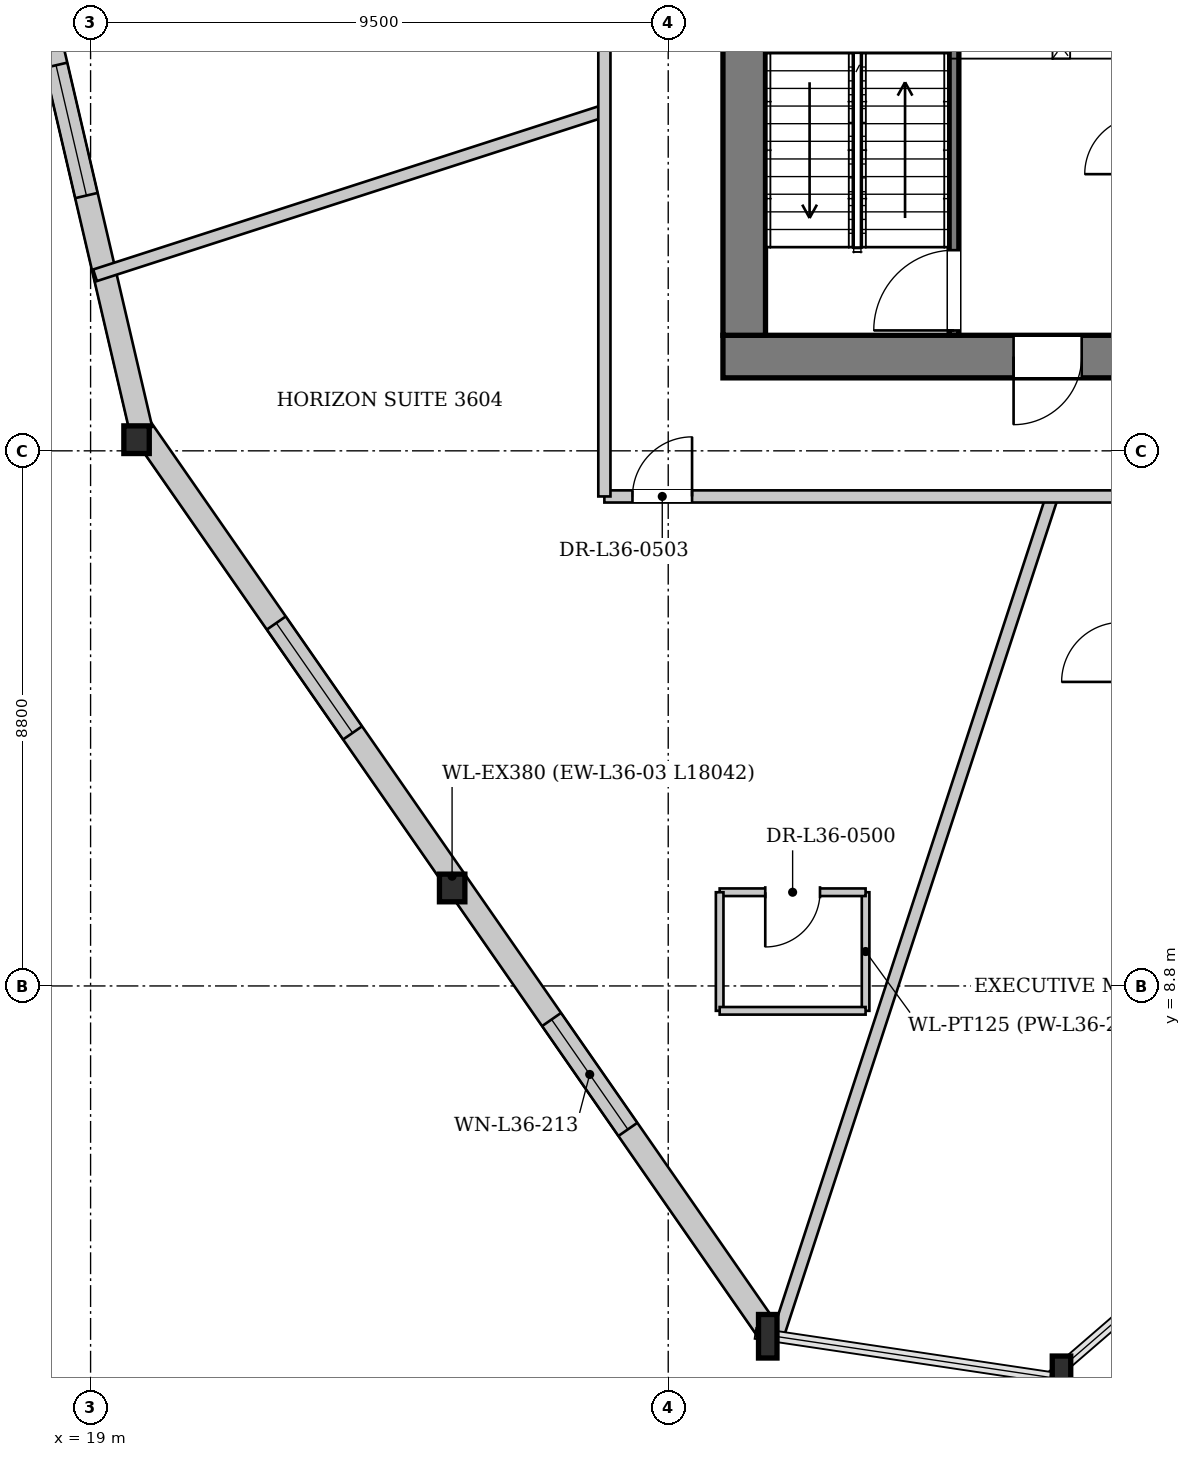
"""IFC4 building model, lengths in metres.
Left out: names, types, materials, properties, quantities, classifications, styles, units other than length and angle.
Written with IfcOpenShell. Run it as: python <this file> out.ifc"""

import sys

from ifc_helpers import new_model, si_unit, direction, frame, frame_2d, origin, origin_2d, place, context, subcontext, project, spatial, rectangle, i_section, extrude, source, transform, mapped, element, fill, save


model = new_model("IFC4")
c1 = context("Model", 3, precision=1e-05, world=origin(), true_north=direction((0.0, 1.0)))
c2 = subcontext(c1, "Body", "Model", "MODEL_VIEW")
j1 = project(units=[si_unit("LENGTHUNIT", "METRE"), si_unit("PLANEANGLEUNIT", "RADIAN")], contexts=[c1])
p1 = place(None, origin())
s1 = spatial("IfcSite", under=j1, at=p1, CompositionType="ELEMENT")
p2 = place(p1, origin())
s2 = spatial("IfcBuilding", under=s1, at=p2, CompositionType="ELEMENT")
p3 = place(p2, frame((0.0, 0.0, 138.1)))
s3 = spatial("IfcBuildingStorey", under=s2, at=p3, CompositionType="ELEMENT", Elevation=138.1)
m1 = source(origin(), c2, "Body", "SweptSolid", [
    extrude(i_section(OverallWidth=0.418, OverallDepth=0.455, WebThickness=0.038, FlangeThickness=0.059, at=origin_2d()), origin(), (0.0, 0.0, 1.0), 3.849),
])
p4 = place(p3, frame((19.644, 17.906, 0.0), z_axis=(0.058158983264, -0.064057331621, 0.996250064457), x_axis=(0.740371121791, 0.672198335329, 0.0)))
e1 = element("IfcColumn", 1, at=p4, inside=s3, PredefinedType="COLUMN", context=c2, shape_type="MappedRepresentation", body=[
    mapped(m1, transform((0.0, 0.0, 0.0), x_axis=(1.0, 0.0, 0.0), y_axis=(0.0, 1.0, 0.0), z_axis=(0.0, 0.0, 1.0), scale=1.0)),
])
m2 = source(origin(), c2, "Body", "SweptSolid", [
    extrude(i_section(OverallWidth=0.418, OverallDepth=0.455, WebThickness=0.038, FlangeThickness=0.059, at=origin_2d()), origin(), (0.0, 0.0, 1.0), 3.852),
])
p5 = place(p3, frame((24.789, 10.497, 0.0), z_axis=(0.08164191411, -0.044307218915, 0.995676387293), x_axis=(0.476986447057, 0.878910649227, 0.0)))
e2 = element("IfcColumn", 2, at=p5, inside=s3, PredefinedType="COLUMN", context=c2, shape_type="MappedRepresentation", body=[
    mapped(m2, transform((0.0, 0.0, 0.0), x_axis=(1.0, 0.0, 0.0), y_axis=(0.0, 1.0, 0.0), z_axis=(0.0, 0.0, 1.0), scale=1.0)),
])
m3 = source(origin(), c2, "Body", "SweptSolid", [
    extrude(i_section(OverallWidth=0.304, OverallDepth=0.716, WebThickness=0.021, FlangeThickness=0.04, at=origin_2d()), origin(), (0.0, 0.0, 1.0), 3.857),
])
p6 = place(p3, frame((29.934, 3.087, 0.0), z_axis=(0.105061568815, -0.02461984956, 0.99416091744), x_axis=(0.228156573902, 0.973624454184, 0.0)))
e3 = element("IfcColumn", 3, at=p6, inside=s3, PredefinedType="COLUMN", context=c2, shape_type="MappedRepresentation", body=[
    mapped(m3, transform((0.0, 0.0, 0.0), x_axis=(1.0, 0.0, 0.0), y_axis=(0.0, 1.0, 0.0), z_axis=(0.0, 0.0, 1.0), scale=1.0)),
])
m4 = source(origin(), c2, "Body", "SweptSolid", [
    extrude(i_section(OverallWidth=0.304, OverallDepth=0.716, WebThickness=0.021, FlangeThickness=0.04, at=origin_2d()), origin(), (0.0, 0.0, 1.0), 3.852),
])
p7 = place(p3, frame((34.785, 2.362, 0.0), z_axis=(0.094871440027, -0.003105344396, 0.995484689337), x_axis=(0.032714610528, 0.999464733874, 0.0)))
e4 = element("IfcColumn", 4, at=p7, inside=s3, PredefinedType="COLUMN", context=c2, shape_type="MappedRepresentation", body=[
    mapped(m4, transform((0.0, 0.0, 0.0), x_axis=(1.0, 0.0, 0.0), y_axis=(0.0, 1.0, 0.0), z_axis=(0.0, 0.0, 1.0), scale=1.0)),
])
p8 = place(p3, frame((30.09, 3.195, 0.0), z_axis=(0.0, 0.0, 1.0), x_axis=(-0.57033951124, 0.821409058824, 0.0)))
e5 = element("IfcWall", 5, at=p8, inside=s3, PredefinedType="SOLIDWALL", context=c2, shape_type="SweptSolid", body=[
    extrude(rectangle(XDim=18.042, YDim=0.38, at=frame_2d((9.021, 0.0))), origin(), (0.0, 0.0, 1.0), 2.972),
])
p9 = place(p8, frame((3.952, 0.0, 0.602)))
e6 = element("IfcOpeningElement", 6, at=p9, cuts=e5, PredefinedType="OPENING", context=c2, shape_type="SweptSolid", body=[
    extrude(rectangle(XDim=2.2, YDim=2.25, at=frame_2d((1.1, 1.125))), frame((0.0, 0.2, 0.0), z_axis=(0.0, -1.0, 0.0), x_axis=(1.0, 0.0, 0.0)), (0.0, 0.0, 1.0), 0.4),
])
p10 = place(p8, frame((11.89, 0.0, 0.602)))
e7 = element("IfcOpeningElement", 7, at=p10, cuts=e5, PredefinedType="OPENING", context=c2, shape_type="SweptSolid", body=[
    extrude(rectangle(XDim=2.2, YDim=2.25, at=frame_2d((1.1, 1.125))), frame((0.0, 0.2, 0.0), z_axis=(0.0, -1.0, 0.0), x_axis=(1.0, 0.0, 0.0)), (0.0, 0.0, 1.0), 0.4),
])
p11 = place(p3, frame((19.829, 17.95, 0.0), z_axis=(0.0, 0.0, 1.0), x_axis=(-0.22713293769, 0.973863762862, 0.0)))
e8 = element("IfcWall", 8, at=p11, inside=s3, PredefinedType="SOLIDWALL", context=c2, shape_type="SweptSolid", body=[
    extrude(rectangle(XDim=18.042, YDim=0.38, at=frame_2d((9.021, 0.0))), origin(), (0.0, 0.0, 1.0), 2.972),
])
p12 = place(p11, frame((3.952, 0.0, 0.602)))
e9 = element("IfcOpeningElement", 9, at=p12, cuts=e8, PredefinedType="OPENING", context=c2, shape_type="SweptSolid", body=[
    extrude(rectangle(XDim=2.2, YDim=2.25, at=frame_2d((1.1, 1.125))), frame((0.0, 0.2, 0.0), z_axis=(0.0, -1.0, 0.0), x_axis=(1.0, 0.0, 0.0)), (0.0, 0.0, 1.0), 0.4),
])
p13 = place(p11, frame((11.89, 0.0, 0.602)))
e10 = element("IfcOpeningElement", 10, at=p13, cuts=e8, PredefinedType="OPENING", context=c2, shape_type="SweptSolid", body=[
    extrude(rectangle(XDim=2.2, YDim=2.25, at=frame_2d((1.1, 1.125))), frame((0.0, 0.2, 0.0), z_axis=(0.0, -1.0, 0.0), x_axis=(1.0, 0.0, 0.0)), (0.0, 0.0, 1.0), 0.4),
])
p14 = place(p3, frame((46.6, 19.15, 0.0), z_axis=(0.0, 0.0, 1.0), x_axis=(-1.0, 0.0, 0.0)))
e11 = element("IfcWall", 11, at=p14, inside=s3, PredefinedType="SHEAR", context=c2, shape_type="SweptSolid", body=[
    extrude(rectangle(XDim=17.2, YDim=0.7, at=frame_2d((8.6, 0.0))), origin(), (0.0, 0.0, 1.0), 3.58),
])
p15 = place(p14, frame((4.8, 0.0, 0.0)))
e12 = element("IfcOpeningElement", 12, at=p15, cuts=e11, PredefinedType="OPENING", context=c2, shape_type="SweptSolid", body=[
    extrude(rectangle(XDim=1.12, YDim=2.25, at=frame_2d((0.56, 1.125))), frame((0.0, 0.36, 0.0), z_axis=(0.0, -1.0, 0.0), x_axis=(1.0, 0.0, 0.0)), (0.0, 0.0, 1.0), 0.72),
])
p16 = place(p14, frame((11.3, 0.0, 0.0)))
e13 = element("IfcOpeningElement", 13, at=p16, cuts=e11, PredefinedType="OPENING", context=c2, shape_type="SweptSolid", body=[
    extrude(rectangle(XDim=1.12, YDim=2.25, at=frame_2d((0.56, 1.125))), frame((0.0, 0.36, 0.0), z_axis=(0.0, -1.0, 0.0), x_axis=(1.0, 0.0, 0.0)), (0.0, 0.0, 1.0), 0.72),
])
p17 = place(p3, frame((29.75, 19.5, 0.0), z_axis=(0.0, 0.0, 1.0), x_axis=(0.0, 1.0, 0.0)))
e14 = element("IfcWall", 14, at=p17, inside=s3, PredefinedType="SHEAR", context=c2, shape_type="SweptSolid", body=[
    extrude(rectangle(XDim=14.2, YDim=0.7, at=frame_2d((7.1, 0.0))), origin(), (0.0, 0.0, 1.0), 3.58),
])
p18 = place(p17, frame((7.42, 0.0, 0.0)))
e15 = element("IfcOpeningElement", 15, at=p18, cuts=e14, PredefinedType="OPENING", context=c2, shape_type="SweptSolid", body=[
    extrude(rectangle(XDim=1.6, YDim=2.2, at=frame_2d((0.8, 1.1))), frame((0.0, 0.36, 0.0), z_axis=(0.0, -1.0, 0.0), x_axis=(1.0, 0.0, 0.0)), (0.0, 0.0, 1.0), 0.72),
])
p19 = place(p3, frame((33.2, 19.5, 0.0), z_axis=(0.0, 0.0, 1.0), x_axis=(0.0, 1.0, 0.0)))
e16 = element("IfcWall", 16, at=p19, inside=s3, PredefinedType="PARTITIONING", context=c2, shape_type="SweptSolid", body=[
    extrude(rectangle(XDim=7.46, YDim=0.16, at=frame_2d((3.73, 0.0))), origin(), (0.0, 0.0, 1.0), 3.58),
])
p20 = place(p19, frame((0.08, 0.0, 0.0)))
e17 = element("IfcOpeningElement", 17, at=p20, cuts=e16, PredefinedType="OPENING", context=c2, shape_type="SweptSolid", body=[
    extrude(rectangle(XDim=1.32, YDim=2.2, at=frame_2d((0.66, 1.1))), frame((0.0, 0.09, 0.0), z_axis=(0.0, -1.0, 0.0), x_axis=(1.0, 0.0, 0.0)), (0.0, 0.0, 1.0), 0.18),
])
p21 = place(p3, frame((27.45, 23.192, 0.0), z_axis=(0.0, 0.0, 1.0), x_axis=(-0.951598248923, -0.307344713061, 0.0)))
e18 = element("IfcWall", 18, at=p21, inside=s3, PredefinedType="PARTITIONING", context=c2, shape_type="SweptSolid", body=[
    extrude(rectangle(XDim=8.803, YDim=0.2, at=frame_2d((4.401, 0.0))), origin(), (0.0, 0.0, 1.0), 3.58),
])
p22 = place(p3, frame((34.813, 16.85, 0.0), z_axis=(0.0, 0.0, 1.0), x_axis=(-0.31067365158, -0.95051663963, 0.0)))
e19 = element("IfcWall", 19, at=p22, inside=s3, PredefinedType="PARTITIONING", context=c2, shape_type="SweptSolid", body=[
    extrude(rectangle(XDim=14.507, YDim=0.2, at=frame_2d((7.253, 0.0))), origin(), (0.0, 0.0, 1.0), 3.075),
])
p23 = place(p3, frame((31.746, 8.391, 0.0), z_axis=(0.0, 0.0, 1.0), x_axis=(0.0, 1.0, 0.0)))
e20 = element("IfcWall", 20, at=p23, inside=s3, PredefinedType="PARTITIONING", context=c2, shape_type="SweptSolid", body=[
    extrude(rectangle(XDim=1.95, YDim=0.125, at=frame_2d((0.975, 0.0))), origin(), (0.0, 0.0, 1.0), 3.58),
])
p24 = place(p3, frame((31.746, 10.341, 0.0), z_axis=(0.0, 0.0, 1.0), x_axis=(-1.0, 0.0, 0.0)))
e21 = element("IfcWall", 21, at=p24, inside=s3, PredefinedType="PARTITIONING", context=c2, shape_type="SweptSolid", body=[
    extrude(rectangle(XDim=2.4, YDim=0.125, at=frame_2d((1.2, 0.0))), origin(), (0.0, 0.0, 1.0), 3.58),
])
p25 = place(p24, frame((0.75, 0.0, 0.0)))
e22 = element("IfcOpeningElement", 22, at=p25, cuts=e21, PredefinedType="OPENING", context=c2, shape_type="SweptSolid", body=[
    extrude(rectangle(XDim=0.9, YDim=2.1, at=frame_2d((0.45, 1.05))), frame((0.0, 0.073, 0.0), z_axis=(0.0, -1.0, 0.0), x_axis=(1.0, 0.0, 0.0)), (0.0, 0.0, 1.0), 0.145),
])
p26 = place(p3, frame((29.346, 10.341, 0.0), z_axis=(0.0, 0.0, 1.0), x_axis=(0.0, -1.0, 0.0)))
e23 = element("IfcWall", 23, at=p26, inside=s3, PredefinedType="PARTITIONING", context=c2, shape_type="SweptSolid", body=[
    extrude(rectangle(XDim=1.95, YDim=0.125, at=frame_2d((0.975, 0.0))), origin(), (0.0, 0.0, 1.0), 3.58),
])
p27 = place(p3, frame((29.346, 8.391, 0.0), z_axis=(0.0, 0.0, 1.0), x_axis=(1.0, 0.0, 0.0)))
e24 = element("IfcWall", 24, at=p27, inside=s3, PredefinedType="PARTITIONING", context=c2, shape_type="SweptSolid", body=[
    extrude(rectangle(XDim=2.4, YDim=0.125, at=frame_2d((1.2, 0.0))), origin(), (0.0, 0.0, 1.0), 3.58),
])
p28 = place(p3, frame((27.45, 16.85, 0.0), z_axis=(0.0, 0.0, 1.0), x_axis=(1.0, 0.0, 0.0)))
e25 = element("IfcWall", 25, at=p28, inside=s3, PredefinedType="PARTITIONING", context=c2, shape_type="SweptSolid", body=[
    extrude(rectangle(XDim=8.5, YDim=0.2, at=frame_2d((4.25, 0.0))), origin(), (0.0, 0.0, 1.0), 3.58),
])
p29 = place(p28, frame((0.462, 0.0, 0.0)))
e26 = element("IfcOpeningElement", 26, at=p29, cuts=e25, PredefinedType="OPENING", context=c2, shape_type="SweptSolid", body=[
    extrude(rectangle(XDim=0.98, YDim=2.15, at=frame_2d((0.49, 1.075))), frame((0.0, 0.11, 0.0), z_axis=(0.0, -1.0, 0.0), x_axis=(1.0, 0.0, 0.0)), (0.0, 0.0, 1.0), 0.22),
])
p30 = place(p3, frame((27.45, 16.85, 0.0), z_axis=(0.0, 0.0, 1.0), x_axis=(0.0, 1.0, 0.0)))
e27 = element("IfcWall", 27, at=p30, inside=s3, PredefinedType="PARTITIONING", context=c2, shape_type="SweptSolid", body=[
    extrude(rectangle(XDim=19.5, YDim=0.2, at=frame_2d((9.75, 0.0))), origin(), (0.0, 0.0, 1.0), 3.58),
])
p31 = place(p30, frame((18.22, 0.0, 0.0)))
e28 = element("IfcOpeningElement", 28, at=p31, cuts=e27, PredefinedType="OPENING", context=c2, shape_type="SweptSolid", body=[
    extrude(rectangle(XDim=0.98, YDim=2.15, at=frame_2d((0.49, 1.075))), frame((0.0, 0.11, 0.0), z_axis=(0.0, -1.0, 0.0), x_axis=(1.0, 0.0, 0.0)), (0.0, 0.0, 1.0), 0.22),
])
p32 = place(p30, frame((11.145, 0.0, 0.0)))
e29 = element("IfcOpeningElement", 29, at=p32, cuts=e27, PredefinedType="OPENING", context=c2, shape_type="SweptSolid", body=[
    extrude(rectangle(XDim=0.98, YDim=2.15, at=frame_2d((0.49, 1.075))), frame((0.0, 0.11, 0.0), z_axis=(0.0, -1.0, 0.0), x_axis=(1.0, 0.0, 0.0)), (0.0, 0.0, 1.0), 0.22),
])
m5 = source(origin(), c2, "Body", "SweptSolid", [
    extrude(rectangle(XDim=2.2, YDim=2.25, at=frame_2d((1.1, 1.125))), frame((0.0, 0.03, 0.0), z_axis=(0.0, -1.0, 0.0), x_axis=(1.0, 0.0, 0.0)), (0.0, 0.0, 1.0), 0.06),
])
p33 = place(p9, origin())
e30 = element("IfcWindow", 30, at=p33, inside=s3, PartitioningType="SINGLE_PANEL", PredefinedType="WINDOW", context=c2, shape_type="MappedRepresentation", body=[
    mapped(m5, transform((0.0, 0.0, 0.0), x_axis=(1.0, 0.0, 0.0), y_axis=(0.0, 1.0, 0.0), z_axis=(0.0, 0.0, 1.0), scale=1.0)),
])
fill(e6, e30)
p34 = place(p10, origin())
e31 = element("IfcWindow", 31, at=p34, inside=s3, PartitioningType="SINGLE_PANEL", PredefinedType="WINDOW", context=c2, shape_type="MappedRepresentation", body=[
    mapped(m5, transform((0.0, 0.0, 0.0), x_axis=(1.0, 0.0, 0.0), y_axis=(0.0, 1.0, 0.0), z_axis=(0.0, 0.0, 1.0), scale=1.0)),
])
fill(e7, e31)
p35 = place(p12, origin())
e32 = element("IfcWindow", 32, at=p35, inside=s3, PartitioningType="SINGLE_PANEL", PredefinedType="WINDOW", context=c2, shape_type="MappedRepresentation", body=[
    mapped(m5, transform((0.0, 0.0, 0.0), x_axis=(1.0, 0.0, 0.0), y_axis=(0.0, 1.0, 0.0), z_axis=(0.0, 0.0, 1.0), scale=1.0)),
])
fill(e9, e32)
m6 = source(origin(), c2, "Body", "SweptSolid", [
    extrude(rectangle(XDim=1.12, YDim=2.25, at=frame_2d((0.56, 1.125))), frame((0.0, 0.025, 0.0), z_axis=(0.0, -1.0, 0.0), x_axis=(1.0, 0.0, 0.0)), (0.0, 0.0, 1.0), 0.05),
])
p36 = place(p16, origin())
e33 = element("IfcDoor", 33, at=p36, inside=s3, OperationType="SINGLE_SWING_RIGHT", PredefinedType="DOOR", context=c2, shape_type="MappedRepresentation", body=[
    mapped(m6, transform((0.0, 0.0, 0.0), x_axis=(1.0, 0.0, 0.0), y_axis=(0.0, 1.0, 0.0), z_axis=(0.0, 0.0, 1.0), scale=1.0)),
])
fill(e13, e33)
m7 = source(origin(), c2, "Body", "SweptSolid", [
    extrude(rectangle(XDim=1.32, YDim=2.2, at=frame_2d((0.66, 1.1))), frame((0.0, 0.025, 0.0), z_axis=(0.0, -1.0, 0.0), x_axis=(1.0, 0.0, 0.0)), (0.0, 0.0, 1.0), 0.05),
])
p37 = place(p20, origin())
e34 = element("IfcDoor", 34, at=p37, inside=s3, OperationType="SINGLE_SWING_LEFT", PredefinedType="DOOR", context=c2, shape_type="MappedRepresentation", body=[
    mapped(m7, transform((0.0, 0.0, 0.0), x_axis=(1.0, 0.0, 0.0), y_axis=(0.0, 1.0, 0.0), z_axis=(0.0, 0.0, 1.0), scale=1.0)),
])
fill(e17, e34)
m8 = source(origin(), c2, "Body", "SweptSolid", [
    extrude(rectangle(XDim=0.9, YDim=2.1, at=frame_2d((0.45, 1.05))), frame((0.0, 0.025, 0.0), z_axis=(0.0, -1.0, 0.0), x_axis=(1.0, 0.0, 0.0)), (0.0, 0.0, 1.0), 0.05),
])
p38 = place(p25, origin())
e35 = element("IfcDoor", 35, at=p38, inside=s3, OperationType="SINGLE_SWING_RIGHT", PredefinedType="DOOR", context=c2, shape_type="MappedRepresentation", body=[
    mapped(m8, transform((0.0, 0.0, 0.0), x_axis=(1.0, 0.0, 0.0), y_axis=(0.0, 1.0, 0.0), z_axis=(0.0, 0.0, 1.0), scale=1.0)),
])
fill(e22, e35)
m9 = source(origin(), c2, "Body", "SweptSolid", [
    extrude(rectangle(XDim=0.98, YDim=2.15, at=frame_2d((0.49, 1.075))), frame((0.0, 0.025, 0.0), z_axis=(0.0, -1.0, 0.0), x_axis=(1.0, 0.0, 0.0)), (0.0, 0.0, 1.0), 0.05),
])
p39 = place(p29, origin())
e36 = element("IfcDoor", 36, at=p39, inside=s3, OperationType="SINGLE_SWING_RIGHT", PredefinedType="DOOR", context=c2, shape_type="MappedRepresentation", body=[
    mapped(m9, transform((0.0, 0.0, 0.0), x_axis=(1.0, 0.0, 0.0), y_axis=(0.0, 1.0, 0.0), z_axis=(0.0, 0.0, 1.0), scale=1.0)),
])
fill(e26, e36)
save(model, sys.argv[1])
